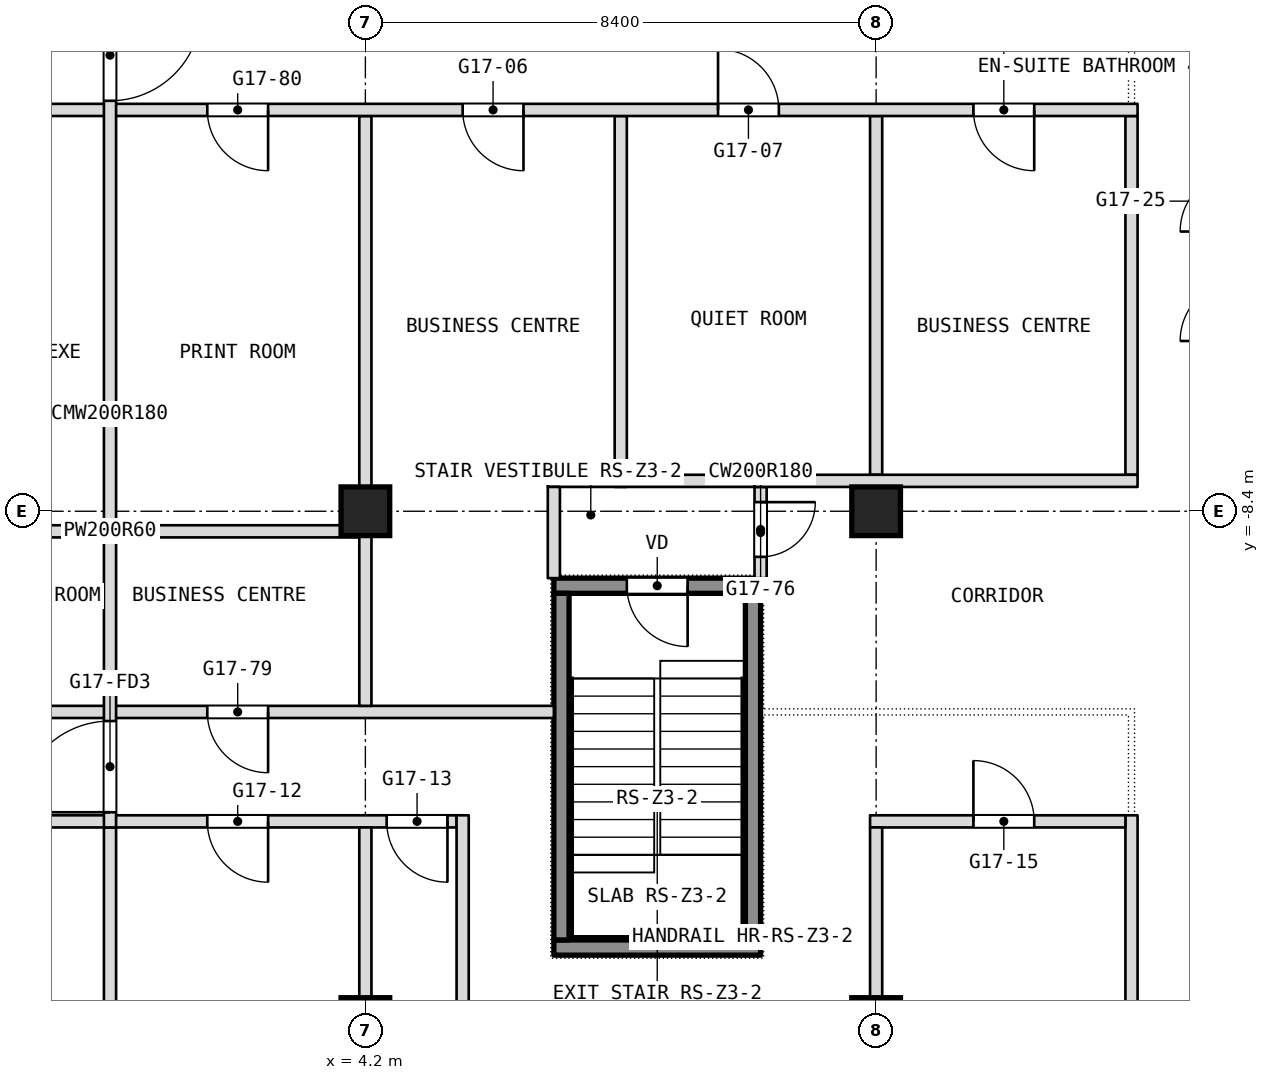
"""IFC4 building model, lengths in metres.
Left out: names, types, materials, properties, quantities, classifications, styles, units other than length and angle.
Written with IfcOpenShell. Run it as: python <this file> out.ifc"""

import sys

from ifc_helpers import new_model, si_unit, direction, frame, frame_2d, origin, origin_2d, place, context, subcontext, project, spatial, rectangle, extrude, element, fill, save


model = new_model("IFC4")
c1 = context("Model", 3, precision=1e-05, world=origin(), true_north=direction((0.0, 1.0)))
c2 = subcontext(c1, "Body", "Model", "MODEL_VIEW")
j1 = project(units=[si_unit("LENGTHUNIT", "METRE"), si_unit("PLANEANGLEUNIT", "RADIAN")], contexts=[c1])
p1 = place(None, origin())
s1 = spatial("IfcSite", under=j1, at=p1, CompositionType="ELEMENT")
p2 = place(p1, origin())
s2 = spatial("IfcBuilding", under=s1, at=p2, CompositionType="ELEMENT")
p3 = place(p2, frame((0.0, 0.0, 212.9)))
s3 = spatial("IfcBuildingStorey", under=s2, at=p3, CompositionType="ELEMENT", Elevation=212.9)
for number, where, z_axis, x_axis in (
    (1, (4.2, -16.8, 0.0), (0.0, 0.0, 1.0), (1.0, 0.0, 0.0)),
    (2, (4.2, -8.4, 0.0), (0.0, 0.0, 1.0), (1.0, 0.0, 0.0)),
    (3, (12.6, -16.8, 0.0), (0.0, 0.0, 1.0), (1.0, 0.0, 0.0)),
    (4, (12.6, -8.4, 0.0), (0.0, 0.0, 1.0), (1.0, 0.0, 0.0)),
):
    element("IfcColumn", number, at=place(p3, frame(where, z_axis=z_axis, x_axis=x_axis)), inside=s3, PredefinedType="COLUMN", context=c2, shape_type="SweptSolid", body=[
        extrude(rectangle(XDim=0.8, YDim=0.8, at=origin_2d()), origin(), (0.0, 0.0, 1.0), 3.6),
    ])
p4 = place(p3, frame((16.8, -20.2, 0.0), z_axis=(0.0, 0.0, 1.0), x_axis=(0.0, 1.0, 0.0)))
e5 = element("IfcWall", 5, at=p4, inside=s3, PredefinedType="PARTITIONING", context=c2, shape_type="SweptSolid", body=[
    extrude(rectangle(XDim=6.8, YDim=0.2, at=frame_2d((3.4, 0.0))), origin(), (0.0, 0.0, 1.0), 3.34),
])
p5 = place(p3, frame((16.8, -7.8, 0.0), z_axis=(0.0, 0.0, 1.0), x_axis=(0.0, 1.0, 0.0)))
e6 = element("IfcWall", 6, at=p5, inside=s3, PredefinedType="PARTITIONING", context=c2, shape_type="SweptSolid", body=[
    extrude(rectangle(XDim=5.9, YDim=0.2, at=frame_2d((2.95, 0.0))), origin(), (0.0, 0.0, 1.0), 3.34),
])
p6 = place(p3, frame((-4.3, -13.5, 0.0), z_axis=(0.0, 0.0, 1.0), x_axis=(1.0, 0.0, 0.0)))
e7 = element("IfcWall", 7, at=p6, inside=s3, PredefinedType="PARTITIONING", context=c2, shape_type="SweptSolid", body=[
    extrude(rectangle(XDim=10.0, YDim=0.2, at=frame_2d((5.0, 0.0))), origin(), (0.0, 0.0, 1.0), 3.34),
])
p7 = place(p6, frame((1.7, 0.0, 0.0)))
e8 = element("IfcOpeningElement", 8, at=p7, cuts=e7, PredefinedType="OPENING", context=c2, shape_type="SweptSolid", body=[
    extrude(rectangle(XDim=1.0, YDim=2.1, at=frame_2d((0.5, 1.05))), frame((0.0, 0.1, 0.0), z_axis=(0.0, -1.0, 0.0), x_axis=(1.0, 0.0, 0.0)), (0.0, 0.0, 1.0), 0.2),
])
p8 = place(p6, frame((5.9, 0.0, 0.0)))
e9 = element("IfcOpeningElement", 9, at=p8, cuts=e7, PredefinedType="OPENING", context=c2, shape_type="SweptSolid", body=[
    extrude(rectangle(XDim=1.0, YDim=2.1, at=frame_2d((0.5, 1.05))), frame((0.0, 0.1, 0.0), z_axis=(0.0, -1.0, 0.0), x_axis=(1.0, 0.0, 0.0)), (0.0, 0.0, 1.0), 0.2),
])
p9 = place(p6, frame((8.85, 0.0, 0.0)))
e10 = element("IfcOpeningElement", 10, at=p9, cuts=e7, PredefinedType="OPENING", context=c2, shape_type="SweptSolid", body=[
    extrude(rectangle(XDim=1.0, YDim=2.1, at=frame_2d((0.5, 1.05))), frame((0.0, 0.1, 0.0), z_axis=(0.0, -1.0, 0.0), x_axis=(1.0, 0.0, 0.0)), (0.0, 0.0, 1.0), 0.2),
])
p10 = place(p3, frame((12.5, -13.5, 0.0), z_axis=(0.0, 0.0, 1.0), x_axis=(1.0, 0.0, 0.0)))
e11 = element("IfcWall", 11, at=p10, inside=s3, PredefinedType="PARTITIONING", context=c2, shape_type="SweptSolid", body=[
    extrude(rectangle(XDim=4.2, YDim=0.2, at=frame_2d((2.1, 0.0))), origin(), (0.0, 0.0, 1.0), 3.34),
])
p11 = place(p10, frame((1.7, 0.0, 0.0)))
e12 = element("IfcOpeningElement", 12, at=p11, cuts=e11, PredefinedType="OPENING", context=c2, shape_type="SweptSolid", body=[
    extrude(rectangle(XDim=1.0, YDim=2.1, at=frame_2d((0.5, 1.05))), frame((0.0, 0.1, 0.0), z_axis=(0.0, -1.0, 0.0), x_axis=(1.0, 0.0, 0.0)), (0.0, 0.0, 1.0), 0.2),
])
p12 = place(p3, frame((12.6, -7.8, 0.0), z_axis=(0.0, 0.0, 1.0), x_axis=(0.0, 1.0, 0.0)))
e13 = element("IfcWall", 13, at=p12, inside=s3, PredefinedType="PARTITIONING", context=c2, shape_type="SweptSolid", body=[
    extrude(rectangle(XDim=5.9, YDim=0.2, at=frame_2d((2.95, 0.0))), origin(), (0.0, 0.0, 1.0), 3.34),
])
p13 = place(p3, frame((12.6, -18.3, 0.0), z_axis=(0.0, 0.0, 1.0), x_axis=(0.0, 1.0, 0.0)))
e14 = element("IfcWall", 14, at=p13, inside=s3, PredefinedType="PARTITIONING", context=c2, shape_type="SweptSolid", body=[
    extrude(rectangle(XDim=4.7, YDim=0.2, at=frame_2d((2.35, 0.0))), origin(), (0.0, 0.0, 1.0), 3.34),
])
p14 = place(p3, frame((-7.3, -11.7, 0.0), z_axis=(0.0, 0.0, 1.0), x_axis=(1.0, 0.0, 0.0)))
e15 = element("IfcWall", 15, at=p14, inside=s3, PredefinedType="PARTITIONING", context=c2, shape_type="SweptSolid", body=[
    extrude(rectangle(XDim=14.6, YDim=0.2, at=frame_2d((7.3, 0.0))), origin(), (0.0, 0.0, 1.0), 3.34),
])
p15 = place(p14, frame((4.7, 0.0, 0.0)))
e16 = element("IfcOpeningElement", 16, at=p15, cuts=e15, PredefinedType="OPENING", context=c2, shape_type="SweptSolid", body=[
    extrude(rectangle(XDim=1.0, YDim=2.1, at=frame_2d((0.5, 1.05))), frame((0.0, 0.1, 0.0), z_axis=(0.0, -1.0, 0.0), x_axis=(1.0, 0.0, 0.0)), (0.0, 0.0, 1.0), 0.2),
])
p16 = place(p14, frame((8.9, 0.0, 0.0)))
e17 = element("IfcOpeningElement", 17, at=p16, cuts=e15, PredefinedType="OPENING", context=c2, shape_type="SweptSolid", body=[
    extrude(rectangle(XDim=1.0, YDim=2.1, at=frame_2d((0.5, 1.05))), frame((0.0, 0.1, 0.0), z_axis=(0.0, -1.0, 0.0), x_axis=(1.0, 0.0, 0.0)), (0.0, 0.0, 1.0), 0.2),
])
p17 = place(p3, frame((10.7, -9.5, 0.0), z_axis=(0.0, 0.0, 1.0), x_axis=(0.0, 1.0, 0.0)))
e18 = element("IfcWall", 18, at=p17, inside=s3, PredefinedType="PARTITIONING", context=c2, shape_type="SweptSolid", body=[
    extrude(rectangle(XDim=1.5, YDim=0.2, at=frame_2d((0.75, 0.0))), origin(), (0.0, 0.0, 1.0), 3.34),
])
p18 = place(p17, frame((0.35, 0.0, 0.0)))
e19 = element("IfcOpeningElement", 19, at=p18, cuts=e18, PredefinedType="OPENING", context=c2, shape_type="SweptSolid", body=[
    extrude(rectangle(XDim=0.9, YDim=2.1, at=frame_2d((0.45, 1.05))), frame((0.0, 0.1, 0.0), z_axis=(0.0, -1.0, 0.0), x_axis=(1.0, 0.0, 0.0)), (0.0, 0.0, 1.0), 0.2),
])
p19 = place(p3, frame((-4.1, -8.73, 0.0), z_axis=(0.0, 0.0, 1.0), x_axis=(1.0, 0.0, 0.0)))
e20 = element("IfcWall", 20, at=p19, inside=s3, PredefinedType="PARTITIONING", context=c2, shape_type="SweptSolid", body=[
    extrude(rectangle(XDim=8.2, YDim=0.2, at=frame_2d((4.1, 0.0))), origin(), (0.0, 0.0, 1.0), 3.34),
])
p20 = place(p3, frame((8.4, -8.0, 0.0), z_axis=(0.0, 0.0, 1.0), x_axis=(0.0, 1.0, 0.0)))
e21 = element("IfcWall", 21, at=p20, inside=s3, PredefinedType="PARTITIONING", context=c2, shape_type="SweptSolid", body=[
    extrude(rectangle(XDim=6.1, YDim=0.2, at=frame_2d((3.05, 0.0))), origin(), (0.0, 0.0, 1.0), 3.34),
])
p21 = place(p3, frame((10.6, -7.9, 0.0), z_axis=(0.0, 0.0, 1.0), x_axis=(1.0, 0.0, 0.0)))
e22 = element("IfcWall", 22, at=p21, inside=s3, PredefinedType="PARTITIONING", context=c2, shape_type="SweptSolid", body=[
    extrude(rectangle(XDim=6.3, YDim=0.2, at=frame_2d((3.15, 0.0))), origin(), (0.0, 0.0, 1.0), 3.34),
])
p22 = place(p3, frame((7.2, -7.9, 0.0), z_axis=(0.0, 0.0, 1.0), x_axis=(1.0, 0.0, 0.0)))
e23 = element("IfcWall", 23, at=p22, inside=s3, PredefinedType="PARTITIONING", context=c2, shape_type="SweptSolid", body=[
    extrude(rectangle(XDim=3.4, YDim=0.2, at=frame_2d((1.7, 0.0))), origin(), (0.0, 0.0, 1.0), 3.34),
])
p23 = place(p3, frame((7.3, -9.5, 0.0), z_axis=(0.0, 0.0, 1.0), x_axis=(0.0, 1.0, 0.0)))
e24 = element("IfcWall", 24, at=p23, inside=s3, PredefinedType="PARTITIONING", context=c2, shape_type="SweptSolid", body=[
    extrude(rectangle(XDim=1.5, YDim=0.2, at=frame_2d((0.75, 0.0))), origin(), (0.0, 0.0, 1.0), 3.34),
])
p24 = place(p3, frame((5.8, -18.3, 0.0), z_axis=(0.0, 0.0, 1.0), x_axis=(0.0, 1.0, 0.0)))
e25 = element("IfcWall", 25, at=p24, inside=s3, PredefinedType="PARTITIONING", context=c2, shape_type="SweptSolid", body=[
    extrude(rectangle(XDim=4.9, YDim=0.2, at=frame_2d((2.45, 0.0))), origin(), (0.0, 0.0, 1.0), 3.34),
])
p25 = place(p3, frame((4.2, -20.0, 0.0), z_axis=(0.0, 0.0, 1.0), x_axis=(0.0, 1.0, 0.0)))
e26 = element("IfcWall", 26, at=p25, inside=s3, PredefinedType="PARTITIONING", context=c2, shape_type="SweptSolid", body=[
    extrude(rectangle(XDim=6.4, YDim=0.2, at=frame_2d((3.2, 0.0))), origin(), (0.0, 0.0, 1.0), 3.34),
])
p26 = place(p3, frame((4.2, -11.6, 0.0), z_axis=(0.0, 0.0, 1.0), x_axis=(0.0, 1.0, 0.0)))
e27 = element("IfcWall", 27, at=p26, inside=s3, PredefinedType="PARTITIONING", context=c2, shape_type="SweptSolid", body=[
    extrude(rectangle(XDim=9.7, YDim=0.2, at=frame_2d((4.85, 0.0))), origin(), (0.0, 0.0, 1.0), 3.34),
])
p27 = place(p3, frame((-16.9, -1.8, 0.0), z_axis=(0.0, 0.0, 1.0), x_axis=(1.0, 0.0, 0.0)))
e28 = element("IfcWall", 28, at=p27, inside=s3, PredefinedType="PARTITIONING", context=c2, shape_type="SweptSolid", body=[
    extrude(rectangle(XDim=33.8, YDim=0.2, at=frame_2d((16.9, 0.0))), origin(), (0.0, 0.0, 1.0), 3.34),
])
p28 = place(p27, frame((1.7, 0.0, 0.0)))
e29 = element("IfcOpeningElement", 29, at=p28, cuts=e28, PredefinedType="OPENING", context=c2, shape_type="SweptSolid", body=[
    extrude(rectangle(XDim=1.0, YDim=2.1, at=frame_2d((0.5, 1.05))), frame((0.0, 0.1, 0.0), z_axis=(0.0, -1.0, 0.0), x_axis=(1.0, 0.0, 0.0)), (0.0, 0.0, 1.0), 0.2),
])
p29 = place(p27, frame((5.9, 0.0, 0.0)))
e30 = element("IfcOpeningElement", 30, at=p29, cuts=e28, PredefinedType="OPENING", context=c2, shape_type="SweptSolid", body=[
    extrude(rectangle(XDim=1.0, YDim=2.1, at=frame_2d((0.5, 1.05))), frame((0.0, 0.1, 0.0), z_axis=(0.0, -1.0, 0.0), x_axis=(1.0, 0.0, 0.0)), (0.0, 0.0, 1.0), 0.2),
])
p30 = place(p27, frame((10.1, 0.0, 0.0)))
e31 = element("IfcOpeningElement", 31, at=p30, cuts=e28, PredefinedType="OPENING", context=c2, shape_type="SweptSolid", body=[
    extrude(rectangle(XDim=1.0, YDim=2.1, at=frame_2d((0.5, 1.05))), frame((0.0, 0.1, 0.0), z_axis=(0.0, -1.0, 0.0), x_axis=(1.0, 0.0, 0.0)), (0.0, 0.0, 1.0), 0.2),
])
p31 = place(p27, frame((22.7, 0.0, 0.0)))
e32 = element("IfcOpeningElement", 32, at=p31, cuts=e28, PredefinedType="OPENING", context=c2, shape_type="SweptSolid", body=[
    extrude(rectangle(XDim=1.0, YDim=2.1, at=frame_2d((0.5, 1.05))), frame((0.0, 0.1, 0.0), z_axis=(0.0, -1.0, 0.0), x_axis=(1.0, 0.0, 0.0)), (0.0, 0.0, 1.0), 0.2),
])
p32 = place(p27, frame((26.9, 0.0, 0.0)))
e33 = element("IfcOpeningElement", 33, at=p32, cuts=e28, PredefinedType="OPENING", context=c2, shape_type="SweptSolid", body=[
    extrude(rectangle(XDim=1.0, YDim=2.1, at=frame_2d((0.5, 1.05))), frame((0.0, 0.1, 0.0), z_axis=(0.0, -1.0, 0.0), x_axis=(1.0, 0.0, 0.0)), (0.0, 0.0, 1.0), 0.2),
])
p33 = place(p27, frame((31.1, 0.0, 0.0)))
e34 = element("IfcOpeningElement", 34, at=p33, cuts=e28, PredefinedType="OPENING", context=c2, shape_type="SweptSolid", body=[
    extrude(rectangle(XDim=1.0, YDim=2.1, at=frame_2d((0.5, 1.05))), frame((0.0, 0.1, 0.0), z_axis=(0.0, -1.0, 0.0), x_axis=(1.0, 0.0, 0.0)), (0.0, 0.0, 1.0), 0.2),
])
p34 = place(p27, frame((14.3, 0.0, 0.0)))
e35 = element("IfcOpeningElement", 35, at=p34, cuts=e28, PredefinedType="OPENING", context=c2, shape_type="SweptSolid", body=[
    extrude(rectangle(XDim=1.0, YDim=2.1, at=frame_2d((0.5, 1.05))), frame((0.0, 0.1, 0.0), z_axis=(0.0, -1.0, 0.0), x_axis=(1.0, 0.0, 0.0)), (0.0, 0.0, 1.0), 0.2),
])
p35 = place(p27, frame((18.5, 0.0, 0.0)))
e36 = element("IfcOpeningElement", 36, at=p35, cuts=e28, PredefinedType="OPENING", context=c2, shape_type="SweptSolid", body=[
    extrude(rectangle(XDim=1.0, YDim=2.1, at=frame_2d((0.5, 1.05))), frame((0.0, 0.1, 0.0), z_axis=(0.0, -1.0, 0.0), x_axis=(1.0, 0.0, 0.0)), (0.0, 0.0, 1.0), 0.2),
])
p36 = place(p3, frame((0.0, -22.0, 0.0), z_axis=(0.0, 0.0, 1.0), x_axis=(0.0, 1.0, 0.0)))
e37 = element("IfcWall", 37, at=p36, inside=s3, PredefinedType="PARTITIONING", context=c2, shape_type="SweptSolid", body=[
    extrude(rectangle(XDim=8.4, YDim=0.2, at=frame_2d((4.2, 0.0))), origin(), (0.0, 0.0, 1.0), 3.34),
])
p37 = place(p36, frame((0.25, 0.0, 0.0)))
e38 = element("IfcOpeningElement", 38, at=p37, cuts=e37, PredefinedType="OPENING", context=c2, shape_type="SweptSolid", body=[
    extrude(rectangle(XDim=1.5, YDim=2.1, at=frame_2d((0.75, 1.05))), frame((0.0, 0.1, 0.0), z_axis=(0.0, -1.0, 0.0), x_axis=(1.0, 0.0, 0.0)), (0.0, 0.0, 1.0), 0.2),
])
p38 = place(p3, frame((0.0, -13.6, 0.0), z_axis=(0.0, 0.0, 1.0), x_axis=(0.0, 1.0, 0.0)))
e39 = element("IfcWall", 39, at=p38, inside=s3, PredefinedType="PARTITIONING", context=c2, shape_type="SweptSolid", body=[
    extrude(rectangle(XDim=13.6, YDim=0.2, at=frame_2d((6.8, 0.0))), origin(), (0.0, 0.0, 1.0), 3.34),
])
p39 = place(p38, frame((11.95, 0.0, 0.0)))
e40 = element("IfcOpeningElement", 40, at=p39, cuts=e39, PredefinedType="OPENING", context=c2, shape_type="SweptSolid", body=[
    extrude(rectangle(XDim=1.5, YDim=2.1, at=frame_2d((0.75, 1.05))), frame((0.0, 0.1, 0.0), z_axis=(0.0, -1.0, 0.0), x_axis=(1.0, 0.0, 0.0)), (0.0, 0.0, 1.0), 0.2),
])
p40 = place(p38, frame((0.25, 0.0, 0.0)))
e41 = element("IfcOpeningElement", 41, at=p40, cuts=e39, PredefinedType="OPENING", context=c2, shape_type="SweptSolid", body=[
    extrude(rectangle(XDim=1.5, YDim=2.1, at=frame_2d((0.75, 1.05))), frame((0.0, 0.1, 0.0), z_axis=(0.0, -1.0, 0.0), x_axis=(1.0, 0.0, 0.0)), (0.0, 0.0, 1.0), 0.2),
])
p41 = place(p3, frame((7.3, -15.575, 0.1), z_axis=(0.0, 0.0, 1.0), x_axis=(1.0, 0.0, 0.0)))
e42 = element("IfcWall", 42, at=p41, inside=s3, PredefinedType="SHEAR", context=c2, shape_type="SweptSolid", body=[
    extrude(rectangle(XDim=3.4, YDim=0.25, at=frame_2d((1.7, 0.0))), origin(), (0.0, 0.0, 1.0), 3.6),
])
p42 = place(p3, frame((7.3, -9.625, 0.1), z_axis=(0.0, 0.0, 1.0), x_axis=(1.0, 0.0, 0.0)))
e43 = element("IfcWall", 43, at=p42, inside=s3, PredefinedType="SHEAR", context=c2, shape_type="SweptSolid", body=[
    extrude(rectangle(XDim=3.4, YDim=0.25, at=frame_2d((1.7, 0.0))), origin(), (0.0, 0.0, 1.0), 3.6),
])
p43 = place(p42, frame((1.2, 0.0, 0.0)))
e44 = element("IfcOpeningElement", 44, at=p43, cuts=e43, PredefinedType="OPENING", context=c2, shape_type="SweptSolid", body=[
    extrude(rectangle(XDim=1.0, YDim=2.1, at=frame_2d((0.5, 1.05))), frame((0.0, 0.125, 0.0), z_axis=(0.0, -1.0, 0.0), x_axis=(1.0, 0.0, 0.0)), (0.0, 0.0, 1.0), 0.25),
])
for number, where, z_axis, x_axis in (
    (45, (7.425, -15.45, 0.1), (0.0, 0.0, 1.0), (0.0, 1.0, 0.0)),
    (46, (10.575, -15.45, 0.1), (0.0, 0.0, 1.0), (0.0, 1.0, 0.0)),
):
    element("IfcWall", number, at=place(p3, frame(where, z_axis=z_axis, x_axis=x_axis)), inside=s3, PredefinedType="SHEAR", context=c2, shape_type="SweptSolid", body=[
        extrude(rectangle(XDim=5.7, YDim=0.25, at=frame_2d((2.85, 0.0))), origin(), (0.0, 0.0, 1.0), 3.6),
    ])
p44 = place(p8, origin())
e47 = element("IfcDoor", 47, at=p44, inside=s3, OperationType="SINGLE_SWING_RIGHT", PredefinedType="DOOR", context=c2, shape_type="SweptSolid", body=[
    extrude(rectangle(XDim=1.0, YDim=2.1, at=frame_2d((0.5, 1.05))), frame((0.0, 0.025, 0.0), z_axis=(0.0, -1.0, 0.0), x_axis=(1.0, 0.0, 0.0)), (0.0, 0.0, 1.0), 0.05),
])
fill(e9, e47)
p45 = place(p9, origin())
e48 = element("IfcDoor", 48, at=p45, inside=s3, OperationType="SINGLE_SWING_LEFT", PredefinedType="DOOR", context=c2, shape_type="SweptSolid", body=[
    extrude(rectangle(XDim=1.0, YDim=2.1, at=frame_2d((0.5, 1.05))), frame((0.0, 0.025, 0.0), z_axis=(0.0, -1.0, 0.0), x_axis=(1.0, 0.0, 0.0)), (0.0, 0.0, 1.0), 0.05),
])
fill(e10, e48)
p46 = place(p11, origin())
e49 = element("IfcDoor", 49, at=p46, inside=s3, OperationType="SINGLE_SWING_LEFT", PredefinedType="DOOR", context=c2, shape_type="SweptSolid", body=[
    extrude(rectangle(XDim=1.0, YDim=2.1, at=frame_2d((0.5, 1.05))), frame((0.0, 0.025, 0.0), z_axis=(0.0, -1.0, 0.0), x_axis=(1.0, 0.0, 0.0)), (0.0, 0.0, 1.0), 0.05),
])
fill(e12, e49)
p47 = place(p16, origin())
e50 = element("IfcDoor", 50, at=p47, inside=s3, OperationType="SINGLE_SWING_LEFT", PredefinedType="DOOR", context=c2, shape_type="SweptSolid", body=[
    extrude(rectangle(XDim=1.0, YDim=2.1, at=frame_2d((0.5, 1.05))), frame((0.0, 0.025, 0.0), z_axis=(0.0, -1.0, 0.0), x_axis=(1.0, 0.0, 0.0)), (0.0, 0.0, 1.0), 0.05),
])
fill(e17, e50)
p48 = place(p18, origin())
e51 = element("IfcDoor", 51, at=p48, inside=s3, OperationType="SINGLE_SWING_RIGHT", PredefinedType="DOOR", context=c2, shape_type="SweptSolid", body=[
    extrude(rectangle(XDim=0.9, YDim=2.1, at=frame_2d((0.45, 1.05))), frame((0.0, 0.025, 0.0), z_axis=(0.0, -1.0, 0.0), x_axis=(1.0, 0.0, 0.0)), (0.0, 0.0, 1.0), 0.05),
])
fill(e19, e51)
p49 = place(p31, origin())
e52 = element("IfcDoor", 52, at=p49, inside=s3, OperationType="SINGLE_SWING_LEFT", PredefinedType="DOOR", context=c2, shape_type="SweptSolid", body=[
    extrude(rectangle(XDim=1.0, YDim=2.1, at=frame_2d((0.5, 1.05))), frame((0.0, 0.025, 0.0), z_axis=(0.0, -1.0, 0.0), x_axis=(1.0, 0.0, 0.0)), (0.0, 0.0, 1.0), 0.05),
])
fill(e32, e52)
p50 = place(p32, origin())
e53 = element("IfcDoor", 53, at=p50, inside=s3, OperationType="SINGLE_SWING_RIGHT", PredefinedType="DOOR", context=c2, shape_type="SweptSolid", body=[
    extrude(rectangle(XDim=1.0, YDim=2.1, at=frame_2d((0.5, 1.05))), frame((0.0, 0.025, 0.0), z_axis=(0.0, -1.0, 0.0), x_axis=(1.0, 0.0, 0.0)), (0.0, 0.0, 1.0), 0.05),
])
fill(e33, e53)
p51 = place(p33, origin())
e54 = element("IfcDoor", 54, at=p51, inside=s3, OperationType="SINGLE_SWING_LEFT", PredefinedType="DOOR", context=c2, shape_type="SweptSolid", body=[
    extrude(rectangle(XDim=1.0, YDim=2.1, at=frame_2d((0.5, 1.05))), frame((0.0, 0.025, 0.0), z_axis=(0.0, -1.0, 0.0), x_axis=(1.0, 0.0, 0.0)), (0.0, 0.0, 1.0), 0.05),
])
fill(e34, e54)
p52 = place(p35, origin())
e55 = element("IfcDoor", 55, at=p52, inside=s3, OperationType="SINGLE_SWING_LEFT", PredefinedType="DOOR", context=c2, shape_type="SweptSolid", body=[
    extrude(rectangle(XDim=1.0, YDim=2.1, at=frame_2d((0.5, 1.05))), frame((0.0, 0.025, 0.0), z_axis=(0.0, -1.0, 0.0), x_axis=(1.0, 0.0, 0.0)), (0.0, 0.0, 1.0), 0.05),
])
fill(e36, e55)
p53 = place(p43, origin())
e56 = element("IfcDoor", 56, at=p53, inside=s3, OperationType="SINGLE_SWING_LEFT", PredefinedType="DOOR", context=c2, shape_type="SweptSolid", body=[
    extrude(rectangle(XDim=1.0, YDim=2.1, at=frame_2d((0.5, 1.05))), frame((0.0, 0.025, 0.0), z_axis=(0.0, -1.0, 0.0), x_axis=(1.0, 0.0, 0.0)), (0.0, 0.0, 1.0), 0.05),
])
fill(e44, e56)
p54 = place(p39, origin())
e57 = element("IfcDoor", 57, at=p54, inside=s3, OperationType="DOUBLE_DOOR_DOUBLE_SWING", PredefinedType="DOOR", context=c2, shape_type="SweptSolid", body=[
    extrude(rectangle(XDim=1.5, YDim=2.1, at=frame_2d((0.75, 1.05))), frame((0.0, 0.025, 0.0), z_axis=(0.0, -1.0, 0.0), x_axis=(1.0, 0.0, 0.0)), (0.0, 0.0, 1.0), 0.05),
])
fill(e40, e57)
p55 = place(p40, origin())
e58 = element("IfcDoor", 58, at=p55, inside=s3, OperationType="DOUBLE_DOOR_DOUBLE_SWING", PredefinedType="DOOR", context=c2, shape_type="SweptSolid", body=[
    extrude(rectangle(XDim=1.5, YDim=2.1, at=frame_2d((0.75, 1.05))), frame((0.0, 0.025, 0.0), z_axis=(0.0, -1.0, 0.0), x_axis=(1.0, 0.0, 0.0)), (0.0, 0.0, 1.0), 0.05),
])
fill(e41, e58)
save(model, sys.argv[1])
